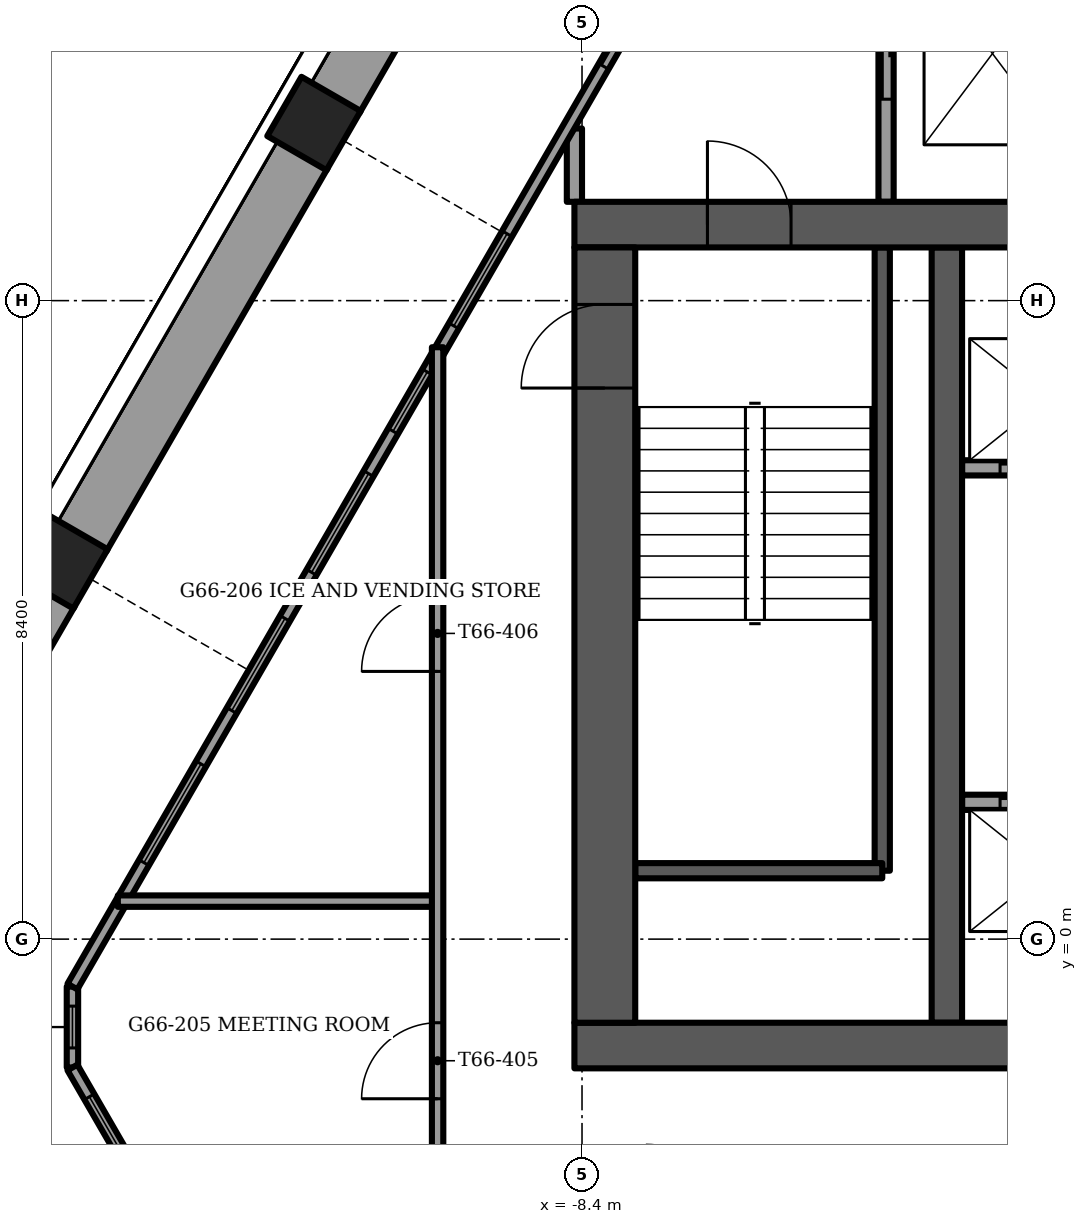
"""IFC4 building model, lengths in metres.
Left out: names, types, materials, properties, quantities, classifications, styles, units other than length and angle.
Written with IfcOpenShell. Run it as: python <this file> out.ifc"""

import sys

from ifc_helpers import new_model, si_unit, direction, frame, frame_2d, origin, origin_2d, place, context, subcontext, project, spatial, rectangle, extrude, element, fill, save


model = new_model("IFC4")
c1 = context("Model", 3, precision=1e-05, world=origin(), true_north=direction((0.0, 1.0)))
c2 = subcontext(c1, "Body", "Model", "MODEL_VIEW")
j1 = project(units=[si_unit("LENGTHUNIT", "METRE"), si_unit("PLANEANGLEUNIT", "RADIAN")], contexts=[c1])
p1 = place(None, origin())
s1 = spatial("IfcSite", under=j1, at=p1, CompositionType="ELEMENT")
p2 = place(p1, origin())
s2 = spatial("IfcBuilding", under=s1, at=p2, CompositionType="ELEMENT")
p3 = place(p2, frame((0.0, 0.0, 267.5)))
s3 = spatial("IfcBuildingStorey", under=s2, at=p3, CompositionType="ELEMENT", Elevation=267.5)
for number, where, z_axis, x_axis in (
    (1, (-11.926, 10.73, -1.2), (0.0, 0.0, 1.0), (0.5, 0.866, 0.0)),
    (2, (-15.256, 4.963, -1.2), (0.0, 0.0, 1.0), (0.5, 0.866, 0.0)),
):
    element("IfcColumn", number, at=place(p3, frame(where, z_axis=z_axis, x_axis=x_axis)), inside=s3, PredefinedType="COLUMN", context=c2, shape_type="SweptSolid", body=[
        extrude(rectangle(XDim=0.9, YDim=0.9, at=origin_2d()), origin(), (0.0, 0.0, 1.0), 3.75),
    ])
p4 = place(p3, frame((-8.5, -1.4, -0.3), z_axis=(0.0, 0.0, 1.0), x_axis=(1.0, 0.0, 0.0)))
e3 = element("IfcWall", 3, at=p4, inside=s3, PredefinedType="SHEAR", context=c2, shape_type="SweptSolid", body=[
    extrude(rectangle(XDim=17.0, YDim=0.6, at=frame_2d((8.5, 0.0))), origin(), (0.0, 0.0, 1.0), 3.75),
])
p5 = place(p4, frame((7.7, 0.0, 0.0)))
e4 = element("IfcOpeningElement", 4, at=p5, cuts=e3, PredefinedType="OPENING", context=c2, shape_type="SweptSolid", body=[
    extrude(rectangle(XDim=1.6, YDim=2.1, at=frame_2d((0.8, 1.05))), frame((0.0, 0.3, 0.0), z_axis=(0.0, -1.0, 0.0), x_axis=(1.0, 0.0, 0.0)), (0.0, 0.0, 1.0), 0.6),
])
p6 = place(p3, frame((-8.5, 9.4, -0.3), z_axis=(0.0, 0.0, 1.0), x_axis=(1.0, 0.0, 0.0)))
e5 = element("IfcWall", 5, at=p6, inside=s3, PredefinedType="SHEAR", context=c2, shape_type="SweptSolid", body=[
    extrude(rectangle(XDim=17.0, YDim=0.6, at=frame_2d((8.5, 0.0))), origin(), (0.0, 0.0, 1.0), 3.75),
])
p7 = place(p6, frame((7.7, 0.0, 0.0)))
e6 = element("IfcOpeningElement", 6, at=p7, cuts=e5, PredefinedType="OPENING", context=c2, shape_type="SweptSolid", body=[
    extrude(rectangle(XDim=1.6, YDim=2.1, at=frame_2d((0.8, 1.05))), frame((0.0, 0.3, 0.0), z_axis=(0.0, -1.0, 0.0), x_axis=(1.0, 0.0, 0.0)), (0.0, 0.0, 1.0), 0.6),
])
p8 = place(p6, frame((1.75, 0.0, 0.0)))
e7 = element("IfcOpeningElement", 7, at=p8, cuts=e5, PredefinedType="OPENING", context=c2, shape_type="SweptSolid", body=[
    extrude(rectangle(XDim=1.1, YDim=2.1, at=frame_2d((0.55, 1.05))), frame((0.0, 0.3, 0.0), z_axis=(0.0, -1.0, 0.0), x_axis=(1.0, 0.0, 0.0)), (0.0, 0.0, 1.0), 0.6),
])
p9 = place(p6, frame((14.15, 0.0, 0.0)))
e8 = element("IfcOpeningElement", 8, at=p9, cuts=e5, PredefinedType="OPENING", context=c2, shape_type="SweptSolid", body=[
    extrude(rectangle(XDim=1.1, YDim=2.1, at=frame_2d((0.55, 1.05))), frame((0.0, 0.3, 0.0), z_axis=(0.0, -1.0, 0.0), x_axis=(1.0, 0.0, 0.0)), (0.0, 0.0, 1.0), 0.6),
])
p10 = place(p3, frame((-8.1, -1.1, -0.3), z_axis=(0.0, 0.0, 1.0), x_axis=(0.0, 1.0, 0.0)))
e9 = element("IfcWall", 9, at=p10, inside=s3, PredefinedType="SHEAR", context=c2, shape_type="SweptSolid", body=[
    extrude(rectangle(XDim=10.2, YDim=0.8, at=frame_2d((5.1, 0.0))), origin(), (0.0, 0.0, 1.0), 3.75),
])
p11 = place(p10, frame((8.35, 0.0, 0.0)))
e10 = element("IfcOpeningElement", 10, at=p11, cuts=e9, PredefinedType="OPENING", context=c2, shape_type="SweptSolid", body=[
    extrude(rectangle(XDim=1.1, YDim=2.1, at=frame_2d((0.55, 1.05))), frame((0.0, 0.4, 0.0), z_axis=(0.0, -1.0, 0.0), x_axis=(1.0, 0.0, 0.0)), (0.0, 0.0, 1.0), 0.8),
])
p12 = place(p3, frame((-3.6, -1.1, -0.3), z_axis=(0.0, 0.0, 1.0), x_axis=(0.0, 1.0, 0.0)))
e11 = element("IfcWall", 11, at=p12, inside=s3, PredefinedType="SHEAR", context=c2, shape_type="SweptSolid", body=[
    extrude(rectangle(XDim=10.2, YDim=0.4, at=frame_2d((5.1, 0.0))), origin(), (0.0, 0.0, 1.0), 3.75),
])
p13 = place(p3, frame((-8.637, 16.428, 0.0), z_axis=(0.0, 0.0, 1.0), x_axis=(-0.499984362083, -0.866034432152, 0.0)))
e12 = element("IfcWall", 12, at=p13, inside=s3, PredefinedType="PARAPET", context=c2, shape_type="SweptSolid", body=[
    extrude(rectangle(XDim=6.159, YDim=0.9, at=frame_2d((3.08, 0.0))), origin(), (0.0, 0.0, 1.0), 1.1),
])
p14 = place(p3, frame((-12.136, 10.366, 0.0), z_axis=(0.0, 0.0, 1.0), x_axis=(-0.499997265274, -0.866026982673, 0.0)))
e13 = element("IfcWall", 13, at=p14, inside=s3, PredefinedType="PARAPET", context=c2, shape_type="SweptSolid", body=[
    extrude(rectangle(XDim=5.819, YDim=0.9, at=frame_2d((2.909, 0.0))), origin(), (0.0, 0.0, 1.0), 1.1),
])
p15 = place(p3, frame((-15.466, 4.6, 0.0), z_axis=(0.0, 0.0, 1.0), x_axis=(-0.499984362083, -0.866034432152, 0.0)))
e14 = element("IfcWall", 14, at=p15, inside=s3, PredefinedType="PARAPET", context=c2, shape_type="SweptSolid", body=[
    extrude(rectangle(XDim=6.159, YDim=0.9, at=frame_2d((3.08, 0.0))), origin(), (0.0, 0.0, 1.0), 1.1),
])
p16 = place(p3, frame((-5.626, 15.792, 0.0), z_axis=(0.0, 0.0, 1.0), x_axis=(-0.499998195608, -0.866026445548, 0.0)))
e15 = element("IfcWall", 15, at=p16, inside=s3, PredefinedType="SOLIDWALL", context=c2, shape_type="SweptSolid", body=[
    extrude(rectangle(XDim=18.956, YDim=0.15, at=frame_2d((9.478, 0.0))), origin(), (0.0, 0.0, 1.0), 3.45),
])
p17 = place(p16, frame((3.577, 0.0, 0.0)))
e16 = element("IfcOpeningElement", 16, at=p17, cuts=e15, PredefinedType="OPENING", context=c2, shape_type="SweptSolid", body=[
    extrude(rectangle(XDim=1.4, YDim=2.4, at=frame_2d((0.7, 1.2))), frame((0.0, 0.075, 0.0), z_axis=(0.0, -1.0, 0.0), x_axis=(1.0, 0.0, 0.0)), (0.0, 0.0, 1.0), 0.15),
])
p18 = place(p16, frame((9.62, 0.0, 0.15)))
e17 = element("IfcOpeningElement", 17, at=p18, cuts=e15, PredefinedType="OPENING", context=c2, shape_type="SweptSolid", body=[
    extrude(rectangle(XDim=0.9, YDim=2.85, at=frame_2d((0.45, 1.425))), frame((0.0, 0.075, 0.0), z_axis=(0.0, -1.0, 0.0), x_axis=(1.0, 0.0, 0.0)), (0.0, 0.0, 1.0), 0.15),
])
p19 = place(p16, frame((7.52, 0.0, 0.15)))
e18 = element("IfcOpeningElement", 18, at=p19, cuts=e15, PredefinedType="OPENING", context=c2, shape_type="SweptSolid", body=[
    extrude(rectangle(XDim=1.4, YDim=2.85, at=frame_2d((0.7, 1.425))), frame((0.0, 0.075, 0.0), z_axis=(0.0, -1.0, 0.0), x_axis=(1.0, 0.0, 0.0)), (0.0, 0.0, 1.0), 0.15),
])
p20 = place(p16, frame((11.164, 0.0, 0.15)))
e19 = element("IfcOpeningElement", 19, at=p20, cuts=e15, PredefinedType="OPENING", context=c2, shape_type="SweptSolid", body=[
    extrude(rectangle(XDim=1.5, YDim=2.85, at=frame_2d((0.75, 1.425))), frame((0.0, 0.075, 0.0), z_axis=(0.0, -1.0, 0.0), x_axis=(1.0, 0.0, 0.0)), (0.0, 0.0, 1.0), 0.15),
])
p21 = place(p16, frame((13.364, 0.0, 0.15)))
e20 = element("IfcOpeningElement", 20, at=p21, cuts=e15, PredefinedType="OPENING", context=c2, shape_type="SweptSolid", body=[
    extrude(rectangle(XDim=1.4, YDim=2.85, at=frame_2d((0.7, 1.425))), frame((0.0, 0.075, 0.0), z_axis=(0.0, -1.0, 0.0), x_axis=(1.0, 0.0, 0.0)), (0.0, 0.0, 1.0), 0.15),
])
p22 = place(p16, frame((0.394, 0.0, 0.15)))
e21 = element("IfcOpeningElement", 21, at=p22, cuts=e15, PredefinedType="OPENING", context=c2, shape_type="SweptSolid", body=[
    extrude(rectangle(XDim=1.5, YDim=2.73, at=frame_2d((0.75, 1.365))), frame((0.0, 0.075, 0.0), z_axis=(0.0, -1.0, 0.0), x_axis=(1.0, 0.0, 0.0)), (0.0, 0.0, 1.0), 0.15),
])
p23 = place(p16, frame((15.574, 0.0, 0.15)))
e22 = element("IfcOpeningElement", 22, at=p23, cuts=e15, PredefinedType="OPENING", context=c2, shape_type="SweptSolid", body=[
    extrude(rectangle(XDim=1.5, YDim=2.73, at=frame_2d((0.75, 1.365))), frame((0.0, 0.075, 0.0), z_axis=(0.0, -1.0, 0.0), x_axis=(1.0, 0.0, 0.0)), (0.0, 0.0, 1.0), 0.15),
])
p24 = place(p3, frame((-15.104, -1.689, 0.0), z_axis=(0.0, 0.0, 1.0), x_axis=(0.499998361514, -0.866026349763, 0.0)))
e23 = element("IfcWall", 23, at=p24, inside=s3, PredefinedType="SOLIDWALL", context=c2, shape_type="SweptSolid", body=[
    extrude(rectangle(XDim=12.179, YDim=0.15, at=frame_2d((6.089, 0.0))), origin(), (0.0, 0.0, 1.0), 3.45),
])
p25 = place(p24, frame((3.548, 0.0, 0.15)))
e24 = element("IfcOpeningElement", 24, at=p25, cuts=e23, PredefinedType="OPENING", context=c2, shape_type="SweptSolid", body=[
    extrude(rectangle(XDim=1.4, YDim=2.85, at=frame_2d((0.7, 1.425))), frame((0.0, 0.075, 0.0), z_axis=(0.0, -1.0, 0.0), x_axis=(1.0, 0.0, 0.0)), (0.0, 0.0, 1.0), 0.15),
])
p26 = place(p24, frame((6.389, 0.0, 0.15)))
e25 = element("IfcOpeningElement", 25, at=p26, cuts=e23, PredefinedType="OPENING", context=c2, shape_type="SweptSolid", body=[
    extrude(rectangle(XDim=1.5, YDim=2.85, at=frame_2d((0.75, 1.425))), frame((0.0, 0.075, 0.0), z_axis=(0.0, -1.0, 0.0), x_axis=(1.0, 0.0, 0.0)), (0.0, 0.0, 1.0), 0.15),
])
p27 = place(p24, frame((8.589, 0.0, 0.0)))
e26 = element("IfcOpeningElement", 26, at=p27, cuts=e23, PredefinedType="OPENING", context=c2, shape_type="SweptSolid", body=[
    extrude(rectangle(XDim=1.4, YDim=2.4, at=frame_2d((0.7, 1.2))), frame((0.0, 0.075, 0.0), z_axis=(0.0, -1.0, 0.0), x_axis=(1.0, 0.0, 0.0)), (0.0, 0.0, 1.0), 0.15),
])
p28 = place(p24, frame((0.445, 0.0, 0.15)))
e27 = element("IfcOpeningElement", 27, at=p28, cuts=e23, PredefinedType="OPENING", context=c2, shape_type="SweptSolid", body=[
    extrude(rectangle(XDim=0.9, YDim=2.73, at=frame_2d((0.45, 1.365))), frame((0.0, 0.075, 0.0), z_axis=(0.0, -1.0, 0.0), x_axis=(1.0, 0.0, 0.0)), (0.0, 0.0, 1.0), 0.15),
])
p29 = place(p3, frame((-15.104, -0.624, 0.0), z_axis=(0.0, 0.0, 1.0), x_axis=(0.0, -1.0, 0.0)))
e28 = element("IfcWall", 28, at=p29, inside=s3, PredefinedType="SOLIDWALL", context=c2, shape_type="SweptSolid", body=[
    extrude(rectangle(XDim=1.065, YDim=0.15, at=frame_2d((0.532, 0.0))), origin(), (0.0, 0.0, 1.0), 3.45),
])
p30 = place(p29, frame((0.258, 0.0, 0.15)))
e29 = element("IfcOpeningElement", 29, at=p30, cuts=e28, PredefinedType="OPENING", context=c2, shape_type="SweptSolid", body=[
    extrude(rectangle(XDim=0.55, YDim=2.85, at=frame_2d((0.275, 1.425))), frame((0.0, 0.075, 0.0), z_axis=(0.0, -1.0, 0.0), x_axis=(1.0, 0.0, 0.0)), (0.0, 0.0, 1.0), 0.15),
])
p31 = place(p3, frame((-3.4, 1.8, 0.0), z_axis=(0.0, 0.0, 1.0), x_axis=(1.0, 0.0, 0.0)))
e30 = element("IfcWall", 30, at=p31, inside=s3, PredefinedType="PARTITIONING", context=c2, shape_type="SweptSolid", body=[
    extrude(rectangle(XDim=2.3, YDim=0.2, at=frame_2d((1.15, 0.0))), origin(), (0.0, 0.0, 1.0), 3.45),
])
p32 = place(p31, frame((0.5, 0.0, 0.0)))
e31 = element("IfcOpeningElement", 31, at=p32, cuts=e30, PredefinedType="OPENING", context=c2, shape_type="SweptSolid", body=[
    extrude(rectangle(XDim=1.2, YDim=2.1, at=frame_2d((0.6, 1.05))), frame((0.0, 0.1, 0.0), z_axis=(0.0, -1.0, 0.0), x_axis=(1.0, 0.0, 0.0)), (0.0, 0.0, 1.0), 0.2),
])
p33 = place(p3, frame((-3.4, 6.2, 0.0), z_axis=(0.0, 0.0, 1.0), x_axis=(1.0, 0.0, 0.0)))
e32 = element("IfcWall", 32, at=p33, inside=s3, PredefinedType="PARTITIONING", context=c2, shape_type="SweptSolid", body=[
    extrude(rectangle(XDim=2.3, YDim=0.2, at=frame_2d((1.15, 0.0))), origin(), (0.0, 0.0, 1.0), 3.45),
])
p34 = place(p33, frame((0.5, 0.0, 0.0)))
e33 = element("IfcOpeningElement", 33, at=p34, cuts=e32, PredefinedType="OPENING", context=c2, shape_type="SweptSolid", body=[
    extrude(rectangle(XDim=1.2, YDim=2.1, at=frame_2d((0.6, 1.05))), frame((0.0, 0.1, 0.0), z_axis=(0.0, -1.0, 0.0), x_axis=(1.0, 0.0, 0.0)), (0.0, 0.0, 1.0), 0.2),
])
p35 = place(p3, frame((-4.45, 0.9, -0.3), z_axis=(0.0, 0.0, 1.0), x_axis=(0.0, 1.0, 0.0)))
e34 = element("IfcWall", 34, at=p35, inside=s3, PredefinedType="SOLIDWALL", context=c2, shape_type="SweptSolid", body=[
    extrude(rectangle(XDim=8.2, YDim=0.2, at=frame_2d((4.1, 0.0))), origin(), (0.0, 0.0, 1.0), 3.75),
])
p36 = place(p3, frame((-7.7, 0.9, -0.3), z_axis=(0.0, 0.0, 1.0), x_axis=(1.0, 0.0, 0.0)))
e35 = element("IfcWall", 35, at=p36, inside=s3, PredefinedType="SOLIDWALL", context=c2, shape_type="SweptSolid", body=[
    extrude(rectangle(XDim=3.25, YDim=0.2, at=frame_2d((1.625, 0.0))), origin(), (0.0, 0.0, 1.0), 3.75),
])
p37 = place(p3, frame((-8.5, 9.7, 0.0), z_axis=(0.0, 0.0, 1.0), x_axis=(0.0, 1.0, 0.0)))
e36 = element("IfcWall", 36, at=p37, inside=s3, PredefinedType="PARTITIONING", context=c2, shape_type="SweptSolid", body=[
    extrude(rectangle(XDim=0.965, YDim=0.2, at=frame_2d((0.482, 0.0))), origin(), (0.0, 0.0, 1.0), 3.45),
])
p38 = place(p3, frame((-4.4, 9.7, 0.0), z_axis=(0.0, 0.0, 1.0), x_axis=(0.0, 1.0, 0.0)))
e37 = element("IfcWall", 37, at=p38, inside=s3, PredefinedType="PARTITIONING", context=c2, shape_type="SweptSolid", body=[
    extrude(rectangle(XDim=3.9, YDim=0.2, at=frame_2d((1.95, 0.0))), origin(), (0.0, 0.0, 1.0), 3.45),
])
p39 = place(p38, frame((1.35, 0.0, 0.0)))
e38 = element("IfcOpeningElement", 38, at=p39, cuts=e37, PredefinedType="OPENING", context=c2, shape_type="SweptSolid", body=[
    extrude(rectangle(XDim=1.2, YDim=2.1, at=frame_2d((0.6, 1.05))), frame((0.0, 0.1, 0.0), z_axis=(0.0, -1.0, 0.0), x_axis=(1.0, 0.0, 0.0)), (0.0, 0.0, 1.0), 0.2),
])
p40 = place(p3, frame((-14.507, 0.5, 0.0), z_axis=(0.0, 0.0, 1.0), x_axis=(1.0, 0.0, 0.0)))
e39 = element("IfcWall", 39, at=p40, inside=s3, PredefinedType="PARTITIONING", context=c2, shape_type="SweptSolid", body=[
    extrude(rectangle(XDim=4.207, YDim=0.15, at=frame_2d((2.104, 0.0))), origin(), (0.0, 0.0, 1.0), 3.45),
])
p41 = place(p3, frame((-10.3, -3.7, 0.0), z_axis=(0.0, 0.0, 1.0), x_axis=(0.0, 1.0, 0.0)))
e40 = element("IfcWall", 40, at=p41, inside=s3, PredefinedType="PARTITIONING", context=c2, shape_type="SweptSolid", body=[
    extrude(rectangle(XDim=11.487, YDim=0.15, at=frame_2d((5.744, 0.0))), origin(), (0.0, 0.0, 1.0), 3.45),
])
p42 = place(p41, frame((1.6, 0.0, 0.0)))
e41 = element("IfcOpeningElement", 41, at=p42, cuts=e40, PredefinedType="OPENING", context=c2, shape_type="SweptSolid", body=[
    extrude(rectangle(XDim=1.0, YDim=2.1, at=frame_2d((0.5, 1.05))), frame((0.0, 0.075, 0.0), z_axis=(0.0, -1.0, 0.0), x_axis=(1.0, 0.0, 0.0)), (0.0, 0.0, 1.0), 0.15),
])
p43 = place(p41, frame((7.222, 0.0, 0.0)))
e42 = element("IfcOpeningElement", 42, at=p43, cuts=e40, PredefinedType="OPENING", context=c2, shape_type="SweptSolid", body=[
    extrude(rectangle(XDim=1.0, YDim=2.1, at=frame_2d((0.5, 1.05))), frame((0.0, 0.075, 0.0), z_axis=(0.0, -1.0, 0.0), x_axis=(1.0, 0.0, 0.0)), (0.0, 0.0, 1.0), 0.15),
])
p44 = place(p17, origin())
e43 = element("IfcDoor", 43, at=p44, inside=s3, OperationType="SLIDING_TO_LEFT", PredefinedType="DOOR", context=c2, shape_type="SweptSolid", body=[
    extrude(rectangle(XDim=1.4, YDim=2.4, at=frame_2d((0.7, 1.2))), frame((0.0, 0.025, 0.0), z_axis=(0.0, -1.0, 0.0), x_axis=(1.0, 0.0, 0.0)), (0.0, 0.0, 1.0), 0.05),
])
fill(e16, e43)
p45 = place(p18, origin())
e44 = element("IfcWindow", 44, at=p45, inside=s3, PartitioningType="SINGLE_PANEL", PredefinedType="WINDOW", context=c2, shape_type="SweptSolid", body=[
    extrude(rectangle(XDim=0.9, YDim=2.85, at=frame_2d((0.45, 1.425))), frame((0.0, 0.03, 0.0), z_axis=(0.0, -1.0, 0.0), x_axis=(1.0, 0.0, 0.0)), (0.0, 0.0, 1.0), 0.06),
])
fill(e17, e44)
p46 = place(p19, origin())
e45 = element("IfcWindow", 45, at=p46, inside=s3, PartitioningType="SINGLE_PANEL", PredefinedType="WINDOW", context=c2, shape_type="SweptSolid", body=[
    extrude(rectangle(XDim=1.4, YDim=2.85, at=frame_2d((0.7, 1.425))), frame((0.0, 0.03, 0.0), z_axis=(0.0, -1.0, 0.0), x_axis=(1.0, 0.0, 0.0)), (0.0, 0.0, 1.0), 0.06),
])
fill(e18, e45)
p47 = place(p20, origin())
e46 = element("IfcWindow", 46, at=p47, inside=s3, PartitioningType="SINGLE_PANEL", PredefinedType="WINDOW", context=c2, shape_type="SweptSolid", body=[
    extrude(rectangle(XDim=1.5, YDim=2.85, at=frame_2d((0.75, 1.425))), frame((0.0, 0.03, 0.0), z_axis=(0.0, -1.0, 0.0), x_axis=(1.0, 0.0, 0.0)), (0.0, 0.0, 1.0), 0.06),
])
fill(e19, e46)
p48 = place(p21, origin())
e47 = element("IfcWindow", 47, at=p48, inside=s3, PartitioningType="SINGLE_PANEL", PredefinedType="WINDOW", context=c2, shape_type="SweptSolid", body=[
    extrude(rectangle(XDim=1.4, YDim=2.85, at=frame_2d((0.7, 1.425))), frame((0.0, 0.03, 0.0), z_axis=(0.0, -1.0, 0.0), x_axis=(1.0, 0.0, 0.0)), (0.0, 0.0, 1.0), 0.06),
])
fill(e20, e47)
p49 = place(p23, origin())
e48 = element("IfcWindow", 48, at=p49, inside=s3, PartitioningType="SINGLE_PANEL", PredefinedType="WINDOW", context=c2, shape_type="SweptSolid", body=[
    extrude(rectangle(XDim=1.5, YDim=2.73, at=frame_2d((0.75, 1.365))), frame((0.0, 0.03, 0.0), z_axis=(0.0, -1.0, 0.0), x_axis=(1.0, 0.0, 0.0)), (0.0, 0.0, 1.0), 0.06),
])
fill(e22, e48)
p50 = place(p28, origin())
e49 = element("IfcWindow", 49, at=p50, inside=s3, PartitioningType="SINGLE_PANEL", PredefinedType="WINDOW", context=c2, shape_type="SweptSolid", body=[
    extrude(rectangle(XDim=0.9, YDim=2.73, at=frame_2d((0.45, 1.365))), frame((0.0, 0.03, 0.0), z_axis=(0.0, -1.0, 0.0), x_axis=(1.0, 0.0, 0.0)), (0.0, 0.0, 1.0), 0.06),
])
fill(e27, e49)
p51 = place(p30, origin())
e50 = element("IfcWindow", 50, at=p51, inside=s3, PartitioningType="SINGLE_PANEL", PredefinedType="WINDOW", context=c2, shape_type="SweptSolid", body=[
    extrude(rectangle(XDim=0.55, YDim=2.85, at=frame_2d((0.275, 1.425))), frame((0.0, 0.03, 0.0), z_axis=(0.0, -1.0, 0.0), x_axis=(1.0, 0.0, 0.0)), (0.0, 0.0, 1.0), 0.06),
])
fill(e29, e50)
p52 = place(p32, origin())
e51 = element("IfcDoor", 51, at=p52, inside=s3, OperationType="SLIDING_TO_LEFT", PredefinedType="DOOR", context=c2, shape_type="SweptSolid", body=[
    extrude(rectangle(XDim=1.2, YDim=2.1, at=frame_2d((0.6, 1.05))), frame((0.0, 0.025, 0.0), z_axis=(0.0, -1.0, 0.0), x_axis=(1.0, 0.0, 0.0)), (0.0, 0.0, 1.0), 0.05),
])
fill(e31, e51)
p53 = place(p34, origin())
e52 = element("IfcDoor", 52, at=p53, inside=s3, OperationType="SLIDING_TO_LEFT", PredefinedType="DOOR", context=c2, shape_type="SweptSolid", body=[
    extrude(rectangle(XDim=1.2, YDim=2.1, at=frame_2d((0.6, 1.05))), frame((0.0, 0.025, 0.0), z_axis=(0.0, -1.0, 0.0), x_axis=(1.0, 0.0, 0.0)), (0.0, 0.0, 1.0), 0.05),
])
fill(e33, e52)
p54 = place(p8, origin())
e53 = element("IfcDoor", 53, at=p54, inside=s3, OperationType="SINGLE_SWING_LEFT", PredefinedType="DOOR", context=c2, shape_type="SweptSolid", body=[
    extrude(rectangle(XDim=1.1, YDim=2.1, at=frame_2d((0.55, 1.05))), frame((0.0, 0.025, 0.0), z_axis=(0.0, -1.0, 0.0), x_axis=(1.0, 0.0, 0.0)), (0.0, 0.0, 1.0), 0.05),
])
fill(e7, e53)
p55 = place(p11, origin())
e54 = element("IfcDoor", 54, at=p55, inside=s3, OperationType="SINGLE_SWING_RIGHT", PredefinedType="DOOR", context=c2, shape_type="SweptSolid", body=[
    extrude(rectangle(XDim=1.1, YDim=2.1, at=frame_2d((0.55, 1.05))), frame((0.0, 0.025, 0.0), z_axis=(0.0, -1.0, 0.0), x_axis=(1.0, 0.0, 0.0)), (0.0, 0.0, 1.0), 0.05),
])
fill(e10, e54)
p56 = place(p39, origin())
e55 = element("IfcDoor", 55, at=p56, inside=s3, OperationType="SLIDING_TO_LEFT", PredefinedType="DOOR", context=c2, shape_type="SweptSolid", body=[
    extrude(rectangle(XDim=1.2, YDim=2.1, at=frame_2d((0.6, 1.05))), frame((0.0, 0.025, 0.0), z_axis=(0.0, -1.0, 0.0), x_axis=(1.0, 0.0, 0.0)), (0.0, 0.0, 1.0), 0.05),
])
fill(e38, e55)
p57 = place(p42, origin())
e56 = element("IfcDoor", 56, at=p57, inside=s3, OperationType="SINGLE_SWING_RIGHT", PredefinedType="DOOR", context=c2, shape_type="SweptSolid", body=[
    extrude(rectangle(XDim=1.0, YDim=2.1, at=frame_2d((0.5, 1.05))), frame((0.0, 0.025, 0.0), z_axis=(0.0, -1.0, 0.0), x_axis=(1.0, 0.0, 0.0)), (0.0, 0.0, 1.0), 0.05),
])
fill(e41, e56)
p58 = place(p43, origin())
e57 = element("IfcDoor", 57, at=p58, inside=s3, OperationType="SINGLE_SWING_LEFT", PredefinedType="DOOR", context=c2, shape_type="SweptSolid", body=[
    extrude(rectangle(XDim=1.0, YDim=2.1, at=frame_2d((0.5, 1.05))), frame((0.0, 0.025, 0.0), z_axis=(0.0, -1.0, 0.0), x_axis=(1.0, 0.0, 0.0)), (0.0, 0.0, 1.0), 0.05),
])
fill(e42, e57)
save(model, sys.argv[1])
